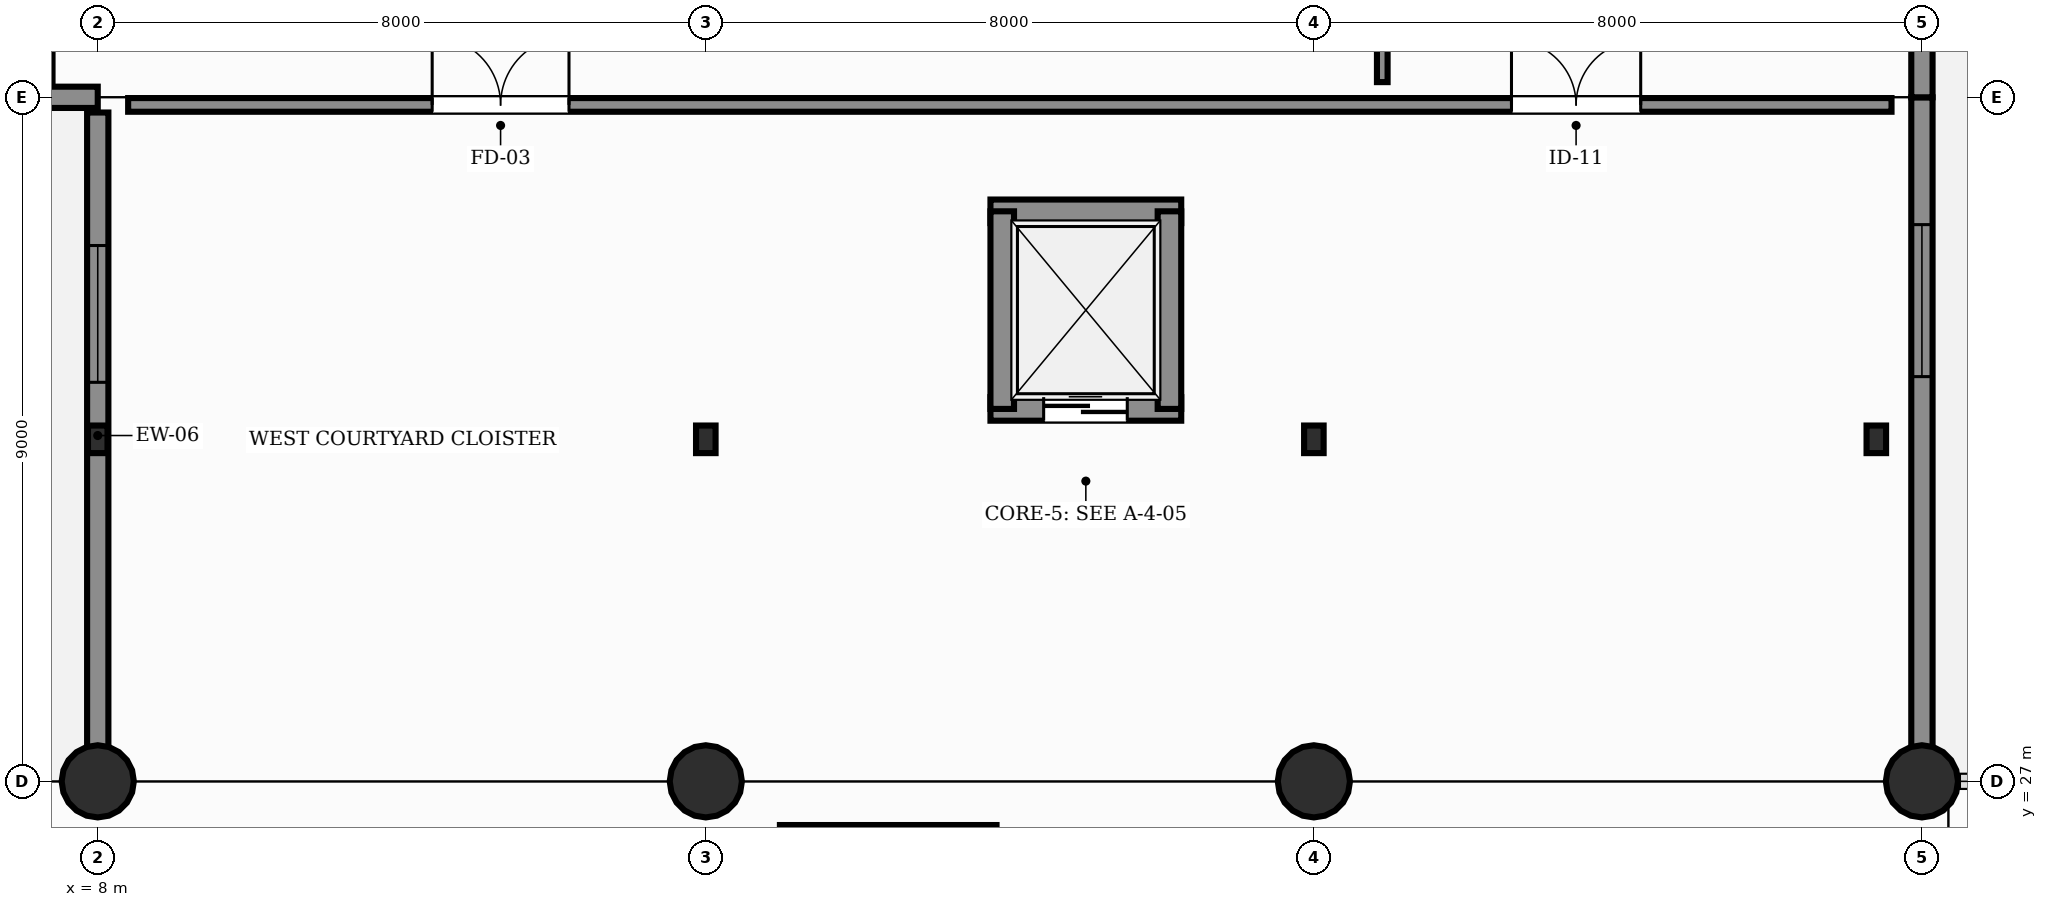
"""IFC4 building model, lengths in metres.
Left out: names, types, materials, properties, quantities, classifications, styles, units other than length and angle.
Written with IfcOpenShell. Run it as: python <this file> out.ifc"""

import sys

from ifc_helpers import new_model, si_unit, direction, frame, frame_2d, origin, origin_2d, place, context, subcontext, project, spatial, rectangle, circle, i_section, extrude, element, fill, save


model = new_model("IFC4")
c1 = context("Model", 3, precision=1e-05, world=origin(), true_north=direction((0.0, 1.0)))
c2 = subcontext(c1, "Body", "Model", "MODEL_VIEW")
j1 = project(units=[si_unit("LENGTHUNIT", "METRE"), si_unit("PLANEANGLEUNIT", "RADIAN")], contexts=[c1])
p1 = place(None, origin())
s1 = spatial("IfcSite", under=j1, at=p1, CompositionType="ELEMENT")
p2 = place(p1, origin())
s2 = spatial("IfcBuilding", under=s1, at=p2, CompositionType="ELEMENT")
p3 = place(p2, origin())
s3 = spatial("IfcBuildingStorey", under=s2, at=p3, CompositionType="ELEMENT", Elevation=0.0)
p4 = place(p3, frame((8.0, 27.0, 0.0), z_axis=(0.0, 0.0, 1.0), x_axis=(1.0, 0.0, 0.0)))
e1 = element("IfcColumn", 1, at=p4, inside=s3, PredefinedType="COLUMN", context=c2, shape_type="SweptSolid", body=[
    extrude(circle(Radius=0.475, at=origin_2d()), origin(), (0.0, 0.0, 1.0), 6.0),
])
p5 = place(p3, frame((8.0, 31.5, 0.0), z_axis=(0.0, 0.0, 1.0), x_axis=(1.0, 0.0, 0.0)))
e2 = element("IfcColumn", 2, at=p5, inside=s3, PredefinedType="COLUMN", context=c2, shape_type="SweptSolid", body=[
    extrude(i_section(OverallWidth=0.257, OverallDepth=0.363, WebThickness=0.013, FlangeThickness=0.022, FilletRadius=0.015, at=origin_2d()), origin(), (0.0, 0.0, 1.0), 6.0),
])
p6 = place(p3, frame((16.0, 27.0, 0.0), z_axis=(0.0, 0.0, 1.0), x_axis=(1.0, 0.0, 0.0)))
e3 = element("IfcColumn", 3, at=p6, inside=s3, PredefinedType="COLUMN", context=c2, shape_type="SweptSolid", body=[
    extrude(circle(Radius=0.475, at=origin_2d()), origin(), (0.0, 0.0, 1.0), 6.0),
])
p7 = place(p3, frame((16.0, 31.5, 0.0), z_axis=(0.0, 0.0, 1.0), x_axis=(1.0, 0.0, 0.0)))
e4 = element("IfcColumn", 4, at=p7, inside=s3, PredefinedType="COLUMN", context=c2, shape_type="SweptSolid", body=[
    extrude(i_section(OverallWidth=0.257, OverallDepth=0.363, WebThickness=0.013, FlangeThickness=0.022, FilletRadius=0.015, at=origin_2d()), origin(), (0.0, 0.0, 1.0), 6.0),
])
p8 = place(p3, frame((24.0, 27.0, 0.0), z_axis=(0.0, 0.0, 1.0), x_axis=(1.0, 0.0, 0.0)))
e5 = element("IfcColumn", 5, at=p8, inside=s3, PredefinedType="COLUMN", context=c2, shape_type="SweptSolid", body=[
    extrude(circle(Radius=0.475, at=origin_2d()), origin(), (0.0, 0.0, 1.0), 6.0),
])
for number, where, z_axis, x_axis in (
    (6, (24.0, 31.5, 0.0), (0.0, 0.0, 1.0), (1.0, 0.0, 0.0)),
    (7, (31.4, 31.5, 0.0), (0.0, 0.0, 1.0), (1.0, 0.0, 0.0)),
):
    element("IfcColumn", number, at=place(p3, frame(where, z_axis=z_axis, x_axis=x_axis)), inside=s3, PredefinedType="COLUMN", context=c2, shape_type="SweptSolid", body=[
        extrude(i_section(OverallWidth=0.257, OverallDepth=0.363, WebThickness=0.013, FlangeThickness=0.022, FilletRadius=0.015, at=origin_2d()), origin(), (0.0, 0.0, 1.0), 6.0),
    ])
p9 = place(p3, frame((32.0, 27.0, 0.0), z_axis=(0.0, 0.0, 1.0), x_axis=(1.0, 0.0, 0.0)))
e8 = element("IfcColumn", 8, at=p9, inside=s3, PredefinedType="COLUMN", context=c2, shape_type="SweptSolid", body=[
    extrude(circle(Radius=0.475, at=origin_2d()), origin(), (0.0, 0.0, 1.0), 6.0),
])
p10 = place(p3, frame((0.0, 36.0, 0.0), z_axis=(0.0, 0.0, 1.0), x_axis=(1.0, 0.0, 0.0)))
e9 = element("IfcWall", 9, at=p10, inside=s3, PredefinedType="SOLIDWALL", context=c2, shape_type="SweptSolid", body=[
    extrude(rectangle(XDim=8.0, YDim=0.28, at=frame_2d((4.0, 0.0))), origin(), (0.0, 0.0, 1.0), 4.85),
])
p11 = place(p10, frame((1.0, 0.0, 0.0)))
e10 = element("IfcOpeningElement", 10, at=p11, cuts=e9, PredefinedType="OPENING", context=c2, shape_type="SweptSolid", body=[
    extrude(rectangle(XDim=6.0, YDim=4.5, at=frame_2d((3.0, 2.25))), frame((0.0, 0.15, 0.0), z_axis=(0.0, -1.0, 0.0), x_axis=(1.0, 0.0, 0.0)), (0.0, 0.0, 1.0), 0.3),
])
p12 = place(p3, frame((8.0, 27.3, 0.0), z_axis=(0.0, 0.0, 1.0), x_axis=(0.0, 1.0, 0.0)))
e11 = element("IfcWall", 11, at=p12, inside=s3, PredefinedType="SOLIDWALL", context=c2, shape_type="SweptSolid", body=[
    extrude(rectangle(XDim=8.5, YDim=0.28, at=frame_2d((4.25, 0.0))), origin(), (0.0, 0.0, 1.0), 4.85),
])
p13 = place(p12, frame((4.95, 0.0, 1.1)))
e12 = element("IfcOpeningElement", 12, at=p13, cuts=e11, PredefinedType="OPENING", context=c2, shape_type="SweptSolid", body=[
    extrude(rectangle(XDim=1.8, YDim=1.35, at=frame_2d((0.9, 0.675))), frame((0.0, 0.15, 0.0), z_axis=(0.0, -1.0, 0.0), x_axis=(1.0, 0.0, 0.0)), (0.0, 0.0, 1.0), 0.3),
])
p14 = place(p3, frame((32.0, 27.45, 0.0), z_axis=(0.0, 0.0, 1.0), x_axis=(0.0, 1.0, 0.0)))
e13 = element("IfcWall", 13, at=p14, inside=s3, PredefinedType="SOLIDWALL", context=c2, shape_type="SweptSolid", body=[
    extrude(rectangle(XDim=8.55, YDim=0.28, at=frame_2d((4.275, 0.0))), origin(), (0.0, 0.0, 1.0), 4.85),
])
p15 = place(p14, frame((4.875, 0.0, 0.95)))
e14 = element("IfcOpeningElement", 14, at=p15, cuts=e13, PredefinedType="OPENING", context=c2, shape_type="SweptSolid", body=[
    extrude(rectangle(XDim=2.0, YDim=2.4, at=frame_2d((1.0, 1.2))), frame((0.0, 0.15, 0.0), z_axis=(0.0, -1.0, 0.0), x_axis=(1.0, 0.0, 0.0)), (0.0, 0.0, 1.0), 0.3),
])
p16 = place(p3, frame((32.0, 36.0, 0.0), z_axis=(0.0, 0.0, 1.0), x_axis=(0.0, 1.0, 0.0)))
e15 = element("IfcWall", 15, at=p16, inside=s3, PredefinedType="SOLIDWALL", context=c2, shape_type="SweptSolid", body=[
    extrude(rectangle(XDim=8.3, YDim=0.28, at=frame_2d((4.15, 0.0))), origin(), (0.0, 0.0, 1.0), 4.85),
])
p17 = place(p16, frame((4.75, 0.0, 0.95)))
e16 = element("IfcOpeningElement", 16, at=p17, cuts=e15, PredefinedType="OPENING", context=c2, shape_type="SweptSolid", body=[
    extrude(rectangle(XDim=2.0, YDim=2.4, at=frame_2d((1.0, 1.2))), frame((0.0, 0.15, 0.0), z_axis=(0.0, -1.0, 0.0), x_axis=(1.0, 0.0, 0.0)), (0.0, 0.0, 1.0), 0.3),
])
p18 = place(p3, frame((16.975, 26.22, 0.0), z_axis=(0.0, 0.0, 1.0), x_axis=(1.0, 0.0, 0.0)))
e17 = element("IfcWall", 17, at=p18, inside=s3, PredefinedType="SHEAR", context=c2, shape_type="SweptSolid", body=[
    extrude(rectangle(XDim=2.85, YDim=0.41, at=frame_2d((1.425, 0.0))), origin(), (0.0, 0.0, 1.0), 6.0),
])
p19 = place(p3, frame((19.745, 31.9, 0.0), z_axis=(0.0, 0.0, 1.0), x_axis=(1.0, 0.0, 0.0)))
e18 = element("IfcWall", 18, at=p19, inside=s3, PredefinedType="SHEAR", context=c2, shape_type="SweptSolid", body=[
    extrude(rectangle(XDim=2.51, YDim=0.31, at=frame_2d((1.255, 0.0))), origin(), (0.0, 0.0, 1.0), 6.0),
])
p20 = place(p19, frame((0.7, 0.0, 0.0)))
e19 = element("IfcOpeningElement", 19, at=p20, cuts=e18, PredefinedType="OPENING", context=c2, shape_type="SweptSolid", body=[
    extrude(rectangle(XDim=1.1, YDim=2.2, at=frame_2d((0.55, 1.1))), frame((0.0, 0.165, 0.0), z_axis=(0.0, -1.0, 0.0), x_axis=(1.0, 0.0, 0.0)), (0.0, 0.0, 1.0), 0.33),
])
p21 = place(p3, frame((19.745, 34.5, 0.0), z_axis=(0.0, 0.0, 1.0), x_axis=(1.0, 0.0, 0.0)))
e20 = element("IfcWall", 20, at=p21, inside=s3, PredefinedType="SHEAR", context=c2, shape_type="SweptSolid", body=[
    extrude(rectangle(XDim=2.51, YDim=0.31, at=frame_2d((1.255, 0.0))), origin(), (0.0, 0.0, 1.0), 6.0),
])
for number, where, z_axis, x_axis in (
    (21, (19.9, 31.9, 0.0), (0.0, 0.0, 1.0), (0.0, 1.0, 0.0)),
    (22, (22.1, 31.9, 0.0), (0.0, 0.0, 1.0), (0.0, 1.0, 0.0)),
):
    element("IfcWall", number, at=place(p3, frame(where, z_axis=z_axis, x_axis=x_axis)), inside=s3, PredefinedType="SHEAR", context=c2, shape_type="SweptSolid", body=[
        extrude(rectangle(XDim=2.6, YDim=0.31, at=frame_2d((1.3, 0.0))), origin(), (0.0, 0.0, 1.0), 6.0),
    ])
p22 = place(p3, frame((8.4, 35.9, 0.0), z_axis=(0.0, 0.0, 1.0), x_axis=(1.0, 0.0, 0.0)))
e23 = element("IfcWall", 23, at=p22, inside=s3, PredefinedType="PARTITIONING", context=c2, shape_type="SweptSolid", body=[
    extrude(rectangle(XDim=23.2, YDim=0.18, at=frame_2d((11.6, 0.0))), origin(), (0.0, 0.0, 1.0), 4.65),
])
p23 = place(p22, frame((4.0, 0.0, 0.0)))
e24 = element("IfcOpeningElement", 24, at=p23, cuts=e23, PredefinedType="OPENING", context=c2, shape_type="SweptSolid", body=[
    extrude(rectangle(XDim=1.8, YDim=2.25, at=frame_2d((0.9, 1.125))), frame((0.0, 0.1, 0.0), z_axis=(0.0, -1.0, 0.0), x_axis=(1.0, 0.0, 0.0)), (0.0, 0.0, 1.0), 0.2),
])
p24 = place(p22, frame((18.2, 0.0, 0.0)))
e25 = element("IfcOpeningElement", 25, at=p24, cuts=e23, PredefinedType="OPENING", context=c2, shape_type="SweptSolid", body=[
    extrude(rectangle(XDim=1.7, YDim=2.25, at=frame_2d((0.85, 1.125))), frame((0.0, 0.1, 0.0), z_axis=(0.0, -1.0, 0.0), x_axis=(1.0, 0.0, 0.0)), (0.0, 0.0, 1.0), 0.2),
])
p25 = place(p3, frame((24.9, 36.2, 0.0), z_axis=(0.0, 0.0, 1.0), x_axis=(0.0, 1.0, 0.0)))
e26 = element("IfcWall", 26, at=p25, inside=s3, PredefinedType="PARTITIONING", context=c2, shape_type="SweptSolid", body=[
    extrude(rectangle(XDim=25.0, YDim=0.14, at=frame_2d((12.5, 0.0))), origin(), (0.0, 0.0, 1.0), 4.65),
])
p26 = place(p25, frame((6.5, 0.0, 0.0)))
e27 = element("IfcOpeningElement", 27, at=p26, cuts=e26, PredefinedType="OPENING", context=c2, shape_type="SweptSolid", body=[
    extrude(rectangle(XDim=1.7, YDim=2.25, at=frame_2d((0.85, 1.125))), frame((0.0, 0.08, 0.0), z_axis=(0.0, -1.0, 0.0), x_axis=(1.0, 0.0, 0.0)), (0.0, 0.0, 1.0), 0.16),
])
p27 = place(p3, frame((7.25, 36.2, 0.0), z_axis=(0.0, 0.0, 1.0), x_axis=(0.0, 1.0, 0.0)))
e28 = element("IfcWall", 28, at=p27, inside=s3, PredefinedType="SHEAR", context=c2, shape_type="SweptSolid", body=[
    extrude(rectangle(XDim=24.4, YDim=0.31, at=frame_2d((12.2, 0.0))), origin(), (0.0, 0.0, 1.0), 6.0),
])
p28 = place(p13, origin())
e29 = element("IfcWindow", 29, at=p28, inside=s3, PartitioningType="SINGLE_PANEL", PredefinedType="WINDOW", context=c2, shape_type="SweptSolid", body=[
    extrude(rectangle(XDim=1.8, YDim=1.35, at=frame_2d((0.9, 0.675))), frame((0.0, 0.03, 0.0), z_axis=(0.0, -1.0, 0.0), x_axis=(1.0, 0.0, 0.0)), (0.0, 0.0, 1.0), 0.06),
])
fill(e12, e29)
p29 = place(p15, origin())
e30 = element("IfcWindow", 30, at=p29, inside=s3, PartitioningType="SINGLE_PANEL", PredefinedType="WINDOW", context=c2, shape_type="SweptSolid", body=[
    extrude(rectangle(XDim=2.0, YDim=2.4, at=frame_2d((1.0, 1.2))), frame((0.0, 0.03, 0.0), z_axis=(0.0, -1.0, 0.0), x_axis=(1.0, 0.0, 0.0)), (0.0, 0.0, 1.0), 0.06),
])
fill(e14, e30)
p30 = place(p20, origin())
e31 = element("IfcDoor", 31, at=p30, inside=s3, OperationType="DOUBLE_DOOR_SLIDING", PredefinedType="DOOR", context=c2, shape_type="SweptSolid", body=[
    extrude(rectangle(XDim=1.1, YDim=2.2, at=frame_2d((0.55, 1.1))), frame((0.0, 0.025, 0.0), z_axis=(0.0, -1.0, 0.0), x_axis=(1.0, 0.0, 0.0)), (0.0, 0.0, 1.0), 0.05),
])
fill(e19, e31)
p31 = place(p23, origin())
e32 = element("IfcDoor", 32, at=p31, inside=s3, OperationType="DOUBLE_DOOR_SINGLE_SWING", PredefinedType="DOOR", context=c2, shape_type="SweptSolid", body=[
    extrude(rectangle(XDim=1.8, YDim=2.25, at=frame_2d((0.9, 1.125))), frame((0.0, 0.025, 0.0), z_axis=(0.0, -1.0, 0.0), x_axis=(1.0, 0.0, 0.0)), (0.0, 0.0, 1.0), 0.05),
])
fill(e24, e32)
p32 = place(p24, origin())
e33 = element("IfcDoor", 33, at=p32, inside=s3, OperationType="DOUBLE_SWING_LEFT", PredefinedType="DOOR", context=c2, shape_type="SweptSolid", body=[
    extrude(rectangle(XDim=1.7, YDim=2.25, at=frame_2d((0.85, 1.125))), frame((0.0, 0.025, 0.0), z_axis=(0.0, -1.0, 0.0), x_axis=(1.0, 0.0, 0.0)), (0.0, 0.0, 1.0), 0.05),
])
fill(e25, e33)
save(model, sys.argv[1])
